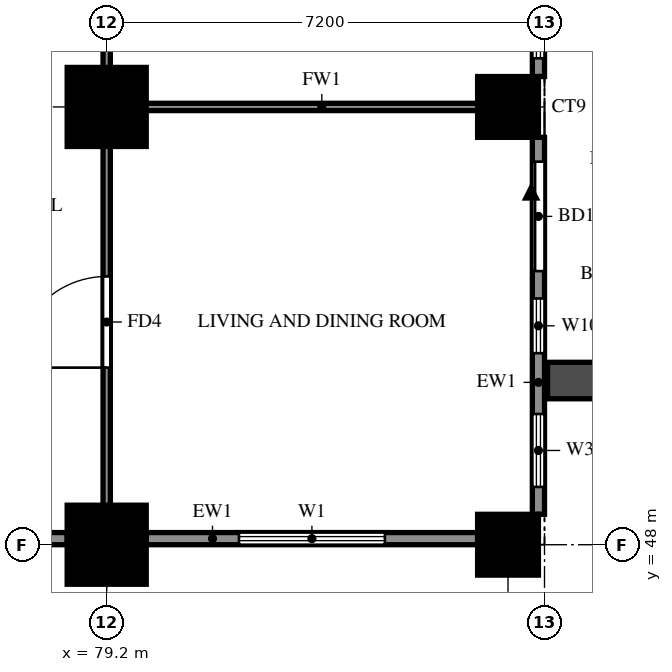
"""IFC4 building model, lengths in metres.
Left out: names, types, materials, properties, quantities, classifications, styles, units other than length and angle.
Written with IfcOpenShell. Run it as: python <this file> out.ifc"""

import sys

from ifc_helpers import new_model, si_unit, direction, frame, frame_2d, origin, origin_2d, place, context, subcontext, project, spatial, rectangle, extrude, source, transform, mapped, element, fill, save


model = new_model("IFC4")
c1 = context("Model", 3, precision=1e-05, world=origin(), true_north=direction((0.0, 1.0)))
c2 = subcontext(c1, "Body", "Model", "MODEL_VIEW")
j1 = project(units=[si_unit("LENGTHUNIT", "METRE"), si_unit("PLANEANGLEUNIT", "RADIAN")], contexts=[c1])
p1 = place(None, origin())
s1 = spatial("IfcSite", under=j1, at=p1, CompositionType="ELEMENT")
p2 = place(p1, origin())
s2 = spatial("IfcBuilding", under=s1, at=p2, CompositionType="ELEMENT")
p3 = place(p2, frame((0.0, 0.0, 72.5)))
s3 = spatial("IfcBuildingStorey", under=s2, at=p3, CompositionType="ELEMENT", Elevation=72.5)
m1 = source(origin(), c2, "Body", "SweptSolid", [
    extrude(rectangle(XDim=1.3, YDim=1.3, at=origin_2d()), origin(), (0.0, 0.0, 1.0), 3.18),
])
p4 = place(p3, frame((79.2, 48.0, 0.0), z_axis=(0.0, 0.0, 1.0), x_axis=(1.0, 0.0, 0.0)))
e1 = element("IfcColumn", 1, at=p4, inside=s3, PredefinedType="COLUMN", context=c2, shape_type="MappedRepresentation", body=[
    mapped(m1, transform((0.0, 0.0, 0.0))),
])
m2 = source(origin(), c2, "Body", "SweptSolid", [
    extrude(rectangle(XDim=1.0, YDim=1.0, at=origin_2d()), origin(), (0.0, 0.0, 1.0), 3.18),
])
p5 = place(p3, frame((85.8, 48.0, 0.0), z_axis=(0.0, 0.0, 1.0), x_axis=(1.0, 0.0, 0.0)))
e2 = element("IfcColumn", 2, at=p5, inside=s3, PredefinedType="COLUMN", context=c2, shape_type="MappedRepresentation", body=[
    mapped(m2, transform((0.0, 0.0, 0.0))),
])
p6 = place(p3, frame((79.2, 55.2, 0.0), z_axis=(0.0, 0.0, 1.0), x_axis=(1.0, 0.0, 0.0)))
e3 = element("IfcColumn", 3, at=p6, inside=s3, PredefinedType="COLUMN", context=c2, shape_type="MappedRepresentation", body=[
    mapped(m1, transform((0.0, 0.0, 0.0))),
])
p7 = place(p3, frame((85.8, 55.2, 0.0), z_axis=(0.0, 0.0, 1.0), x_axis=(1.0, 0.0, 0.0)))
e4 = element("IfcColumn", 4, at=p7, inside=s3, PredefinedType="COLUMN", context=c2, shape_type="MappedRepresentation", body=[
    mapped(m2, transform((0.0, 0.0, 0.0))),
])
p8 = place(p3, frame((85.996, 33.863, 0.0), z_axis=(0.0, 0.0, 1.0), x_axis=(-0.707100718496, 0.707112843825, 0.0)))
e5 = element("IfcWall", 5, at=p8, inside=s3, PredefinedType="SOLIDWALL", context=c2, shape_type="SweptSolid", body=[
    extrude(rectangle(XDim=20.135, YDim=0.2, at=frame_2d((10.067, 0.0))), origin(), (0.0, 0.0, 1.0), 3.18),
])
p9 = place(p3, frame((71.989, 48.1, 0.0), z_axis=(0.0, 0.0, 1.0), x_axis=(1.0, 0.0, 0.0)))
e6 = element("IfcWall", 6, at=p9, inside=s3, PredefinedType="SOLIDWALL", context=c2, shape_type="SweptSolid", body=[
    extrude(rectangle(XDim=6.562, YDim=0.2, at=frame_2d((3.281, 0.0))), origin(), (0.0, 0.0, 1.0), 3.18),
])
p10 = place(p9, frame((2.206, 0.0, 1.5)))
e7 = element("IfcOpeningElement", 7, at=p10, cuts=e6, PredefinedType="OPENING", context=c2, shape_type="SweptSolid", body=[
    extrude(rectangle(XDim=0.9, YDim=0.9, at=frame_2d((0.45, 0.45))), frame((0.0, 0.11, 0.0), z_axis=(0.0, -1.0, 0.0), x_axis=(1.0, 0.0, 0.0)), (0.0, 0.0, 1.0), 0.22),
])
p11 = place(p3, frame((79.85, 48.1, 0.0), z_axis=(0.0, 0.0, 1.0), x_axis=(1.0, 0.0, 0.0)))
e8 = element("IfcWall", 8, at=p11, inside=s3, PredefinedType="SOLIDWALL", context=c2, shape_type="SweptSolid", body=[
    extrude(rectangle(XDim=5.45, YDim=0.2, at=frame_2d((2.725, 0.0))), origin(), (0.0, 0.0, 1.0), 3.18),
])
p12 = place(p11, frame((1.525, 0.0, 0.6)))
e9 = element("IfcOpeningElement", 9, at=p12, cuts=e8, PredefinedType="OPENING", context=c2, shape_type="SweptSolid", body=[
    extrude(rectangle(XDim=2.4, YDim=2.4, at=frame_2d((1.2, 1.2))), frame((0.0, 0.11, 0.0), z_axis=(0.0, -1.0, 0.0), x_axis=(1.0, 0.0, 0.0)), (0.0, 0.0, 1.0), 0.22),
])
p13 = place(p3, frame((86.3, 48.5, 0.0), z_axis=(0.0, 0.0, 1.0), x_axis=(0.0, 1.0, 0.0)))
e10 = element("IfcWall", 10, at=p13, inside=s3, PredefinedType="SOLIDWALL", context=c2, shape_type="SweptSolid", body=[
    extrude(rectangle(XDim=6.2, YDim=0.2, at=frame_2d((3.1, 0.0))), origin(), (0.0, 0.0, 1.0), 3.18),
])
p14 = place(p13, frame((4.0, 0.0, 0.0)))
e11 = element("IfcOpeningElement", 11, at=p14, cuts=e10, PredefinedType="OPENING", context=c2, shape_type="SweptSolid", body=[
    extrude(rectangle(XDim=1.8, YDim=2.4, at=frame_2d((0.9, 1.2))), frame((0.0, 0.11, 0.0), z_axis=(0.0, -1.0, 0.0), x_axis=(1.0, 0.0, 0.0)), (0.0, 0.0, 1.0), 0.22),
])
p15 = place(p13, frame((0.45, 0.0, 0.6)))
e12 = element("IfcOpeningElement", 12, at=p15, cuts=e10, PredefinedType="OPENING", context=c2, shape_type="SweptSolid", body=[
    extrude(rectangle(XDim=1.2, YDim=2.4, at=frame_2d((0.6, 1.2))), frame((0.0, 0.11, 0.0), z_axis=(0.0, -1.0, 0.0), x_axis=(1.0, 0.0, 0.0)), (0.0, 0.0, 1.0), 0.22),
])
p16 = place(p13, frame((2.65, 0.0, 0.6)))
e13 = element("IfcOpeningElement", 13, at=p16, cuts=e10, PredefinedType="OPENING", context=c2, shape_type="SweptSolid", body=[
    extrude(rectangle(XDim=0.9, YDim=2.4, at=frame_2d((0.45, 1.2))), frame((0.0, 0.11, 0.0), z_axis=(0.0, -1.0, 0.0), x_axis=(1.0, 0.0, 0.0)), (0.0, 0.0, 1.0), 0.22),
])
p17 = place(p3, frame((86.3, 55.7, 0.0), z_axis=(0.0, 0.0, 1.0), x_axis=(0.0, 1.0, 0.0)))
e14 = element("IfcWall", 14, at=p17, inside=s3, PredefinedType="SOLIDWALL", context=c2, shape_type="SweptSolid", body=[
    extrude(rectangle(XDim=6.2, YDim=0.2, at=frame_2d((3.1, 0.0))), origin(), (0.0, 0.0, 1.0), 3.18),
])
p18 = place(p17, frame((0.3, 0.0, 0.6)))
e15 = element("IfcOpeningElement", 15, at=p18, cuts=e14, PredefinedType="OPENING", context=c2, shape_type="SweptSolid", body=[
    extrude(rectangle(XDim=0.9, YDim=2.4, at=frame_2d((0.45, 1.2))), frame((0.0, 0.11, 0.0), z_axis=(0.0, -1.0, 0.0), x_axis=(1.0, 0.0, 0.0)), (0.0, 0.0, 1.0), 0.22),
])
p19 = place(p17, frame((2.05, 0.0, 0.6)))
e16 = element("IfcOpeningElement", 16, at=p19, cuts=e14, PredefinedType="OPENING", context=c2, shape_type="SweptSolid", body=[
    extrude(rectangle(XDim=0.9, YDim=2.4, at=frame_2d((0.45, 1.2))), frame((0.0, 0.11, 0.0), z_axis=(0.0, -1.0, 0.0), x_axis=(1.0, 0.0, 0.0)), (0.0, 0.0, 1.0), 0.22),
])
p20 = place(p17, frame((3.65, 0.0, 0.6)))
e17 = element("IfcOpeningElement", 17, at=p20, cuts=e14, PredefinedType="OPENING", context=c2, shape_type="SweptSolid", body=[
    extrude(rectangle(XDim=1.8, YDim=2.4, at=frame_2d((0.9, 1.2))), frame((0.0, 0.11, 0.0), z_axis=(0.0, -1.0, 0.0), x_axis=(1.0, 0.0, 0.0)), (0.0, 0.0, 1.0), 0.22),
])
p21 = place(p3, frame((86.45, 50.7, 0.0), z_axis=(0.0, 0.0, 1.0), x_axis=(1.0, 0.0, 0.0)))
e18 = element("IfcWall", 18, at=p21, inside=s3, PredefinedType="SOLIDWALL", context=c2, shape_type="SweptSolid", body=[
    extrude(rectangle(XDim=2.65, YDim=0.6, at=frame_2d((1.325, 0.0))), origin(), (0.0, 0.0, 1.0), 2.85),
])
p22 = place(p3, frame((79.2, 55.2, 0.0), z_axis=(0.0, 0.0, 1.0), x_axis=(1.0, 0.0, 0.0)))
e19 = element("IfcWall", 19, at=p22, inside=s3, PredefinedType="PARTITIONING", context=c2, shape_type="SweptSolid", body=[
    extrude(rectangle(XDim=7.075, YDim=0.12, at=frame_2d((3.538, 0.0))), origin(), (0.0, 0.0, 1.0), 3.18),
])
p23 = place(p3, frame((79.2, 48.125, 0.0), z_axis=(0.0, 0.0, 1.0), x_axis=(0.0, 1.0, 0.0)))
e20 = element("IfcWall", 20, at=p23, inside=s3, PredefinedType="PARTITIONING", context=c2, shape_type="SweptSolid", body=[
    extrude(rectangle(XDim=25.075, YDim=0.12, at=frame_2d((12.538, 0.0))), origin(), (0.0, 0.0, 1.0), 3.18),
])
p24 = place(p23, frame((2.788, 0.0, 0.0)))
e21 = element("IfcOpeningElement", 21, at=p24, cuts=e20, PredefinedType="OPENING", context=c2, shape_type="SweptSolid", body=[
    extrude(rectangle(XDim=1.5, YDim=2.1, at=frame_2d((0.75, 1.05))), frame((0.0, 0.07, 0.0), z_axis=(0.0, -1.0, 0.0), x_axis=(1.0, 0.0, 0.0)), (0.0, 0.0, 1.0), 0.14),
])
p25 = place(p23, frame((8.425, 0.0, 0.0)))
e22 = element("IfcOpeningElement", 22, at=p25, cuts=e20, PredefinedType="OPENING", context=c2, shape_type="SweptSolid", body=[
    extrude(rectangle(XDim=0.9, YDim=2.1, at=frame_2d((0.45, 1.05))), frame((0.0, 0.07, 0.0), z_axis=(0.0, -1.0, 0.0), x_axis=(1.0, 0.0, 0.0)), (0.0, 0.0, 1.0), 0.14),
])
p26 = place(p23, frame((12.025, 0.0, 0.0)))
e23 = element("IfcOpeningElement", 23, at=p26, cuts=e20, PredefinedType="OPENING", context=c2, shape_type="SweptSolid", body=[
    extrude(rectangle(XDim=0.9, YDim=2.1, at=frame_2d((0.45, 1.05))), frame((0.0, 0.07, 0.0), z_axis=(0.0, -1.0, 0.0), x_axis=(1.0, 0.0, 0.0)), (0.0, 0.0, 1.0), 0.14),
])
p27 = place(p23, frame((15.625, 0.0, 0.0)))
e24 = element("IfcOpeningElement", 24, at=p27, cuts=e20, PredefinedType="OPENING", context=c2, shape_type="SweptSolid", body=[
    extrude(rectangle(XDim=0.9, YDim=2.1, at=frame_2d((0.45, 1.05))), frame((0.0, 0.07, 0.0), z_axis=(0.0, -1.0, 0.0), x_axis=(1.0, 0.0, 0.0)), (0.0, 0.0, 1.0), 0.14),
])
p28 = place(p23, frame((19.225, 0.0, 0.0)))
e25 = element("IfcOpeningElement", 25, at=p28, cuts=e20, PredefinedType="OPENING", context=c2, shape_type="SweptSolid", body=[
    extrude(rectangle(XDim=0.9, YDim=2.1, at=frame_2d((0.45, 1.05))), frame((0.0, 0.07, 0.0), z_axis=(0.0, -1.0, 0.0), x_axis=(1.0, 0.0, 0.0)), (0.0, 0.0, 1.0), 0.14),
])
p29 = place(p23, frame((22.825, 0.0, 0.0)))
e26 = element("IfcOpeningElement", 26, at=p29, cuts=e20, PredefinedType="OPENING", context=c2, shape_type="SweptSolid", body=[
    extrude(rectangle(XDim=0.9, YDim=2.1, at=frame_2d((0.45, 1.05))), frame((0.0, 0.07, 0.0), z_axis=(0.0, -1.0, 0.0), x_axis=(1.0, 0.0, 0.0)), (0.0, 0.0, 1.0), 0.14),
])
p30 = place(p12, origin())
e27 = element("IfcWindow", 27, at=p30, inside=s3, PartitioningType="DOUBLE_PANEL_VERTICAL", PredefinedType="WINDOW", context=c2, shape_type="SweptSolid", body=[
    extrude(rectangle(XDim=2.4, YDim=2.4, at=frame_2d((1.2, 1.2))), frame((0.0, 0.03, 0.0), z_axis=(0.0, -1.0, 0.0), x_axis=(1.0, 0.0, 0.0)), (0.0, 0.0, 1.0), 0.06),
])
fill(e9, e27)
p31 = place(p14, origin())
e28 = element("IfcDoor", 28, at=p31, inside=s3, OperationType="DOUBLE_DOOR_SLIDING", PredefinedType="DOOR", context=c2, shape_type="SweptSolid", body=[
    extrude(rectangle(XDim=1.8, YDim=2.4, at=frame_2d((0.9, 1.2))), frame((0.0, 0.025, 0.0), z_axis=(0.0, -1.0, 0.0), x_axis=(1.0, 0.0, 0.0)), (0.0, 0.0, 1.0), 0.05),
])
fill(e11, e28)
p32 = place(p15, origin())
e29 = element("IfcWindow", 29, at=p32, inside=s3, PartitioningType="SINGLE_PANEL", PredefinedType="WINDOW", context=c2, shape_type="SweptSolid", body=[
    extrude(rectangle(XDim=1.2, YDim=2.4, at=frame_2d((0.6, 1.2))), frame((0.0, 0.03, 0.0), z_axis=(0.0, -1.0, 0.0), x_axis=(1.0, 0.0, 0.0)), (0.0, 0.0, 1.0), 0.06),
])
fill(e12, e29)
p33 = place(p16, origin())
e30 = element("IfcWindow", 30, at=p33, inside=s3, PartitioningType="SINGLE_PANEL", PredefinedType="WINDOW", context=c2, shape_type="SweptSolid", body=[
    extrude(rectangle(XDim=0.9, YDim=2.4, at=frame_2d((0.45, 1.2))), frame((0.0, 0.03, 0.0), z_axis=(0.0, -1.0, 0.0), x_axis=(1.0, 0.0, 0.0)), (0.0, 0.0, 1.0), 0.06),
])
fill(e13, e30)
p34 = place(p18, origin())
e31 = element("IfcWindow", 31, at=p34, inside=s3, PartitioningType="SINGLE_PANEL", PredefinedType="WINDOW", context=c2, shape_type="SweptSolid", body=[
    extrude(rectangle(XDim=0.9, YDim=2.4, at=frame_2d((0.45, 1.2))), frame((0.0, 0.03, 0.0), z_axis=(0.0, -1.0, 0.0), x_axis=(1.0, 0.0, 0.0)), (0.0, 0.0, 1.0), 0.06),
])
fill(e15, e31)
p35 = place(p24, origin())
e32 = element("IfcDoor", 32, at=p35, inside=s3, OperationType="SINGLE_SWING_RIGHT", PredefinedType="DOOR", context=c2, shape_type="SweptSolid", body=[
    extrude(rectangle(XDim=1.5, YDim=2.1, at=frame_2d((0.75, 1.05))), frame((0.0, 0.025, 0.0), z_axis=(0.0, -1.0, 0.0), x_axis=(1.0, 0.0, 0.0)), (0.0, 0.0, 1.0), 0.05),
])
fill(e21, e32)
save(model, sys.argv[1])
